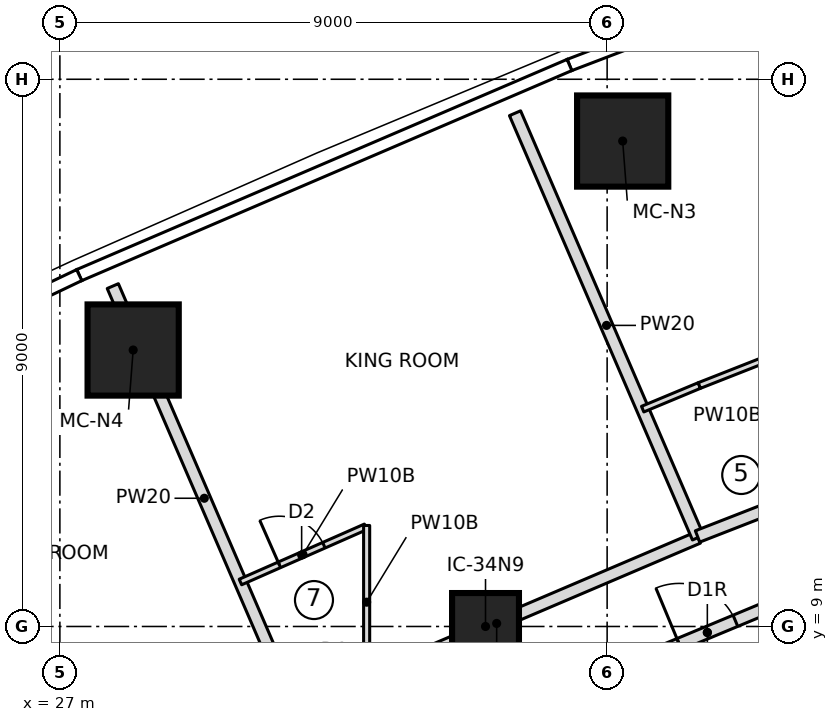
"""IFC4 building model, lengths in metres.
Left out: names, types, materials, properties, quantities, classifications, styles, units other than length and angle.
Written with IfcOpenShell. Run it as: python <this file> out.ifc"""

import sys

from ifc_helpers import new_model, si_unit, direction, frame, frame_2d, origin, origin_2d, place, context, subcontext, project, spatial, rectangle, extrude, element, fill, save


model = new_model("IFC4")
c1 = context("Model", 3, precision=1e-05, world=origin(), true_north=direction((0.0, 1.0)))
c2 = subcontext(c1, "Body", "Model", "MODEL_VIEW")
j1 = project(units=[si_unit("LENGTHUNIT", "METRE"), si_unit("PLANEANGLEUNIT", "RADIAN")], contexts=[c1])
p1 = place(None, origin())
s1 = spatial("IfcSite", under=j1, at=p1, CompositionType="ELEMENT")
p2 = place(p1, origin())
s2 = spatial("IfcBuilding", under=s1, at=p2, CompositionType="ELEMENT")
p3 = place(p2, frame((0.0, 0.0, 137.3)))
s3 = spatial("IfcBuildingStorey", under=s2, at=p3, CompositionType="ELEMENT", Elevation=137.3)
for number, where, z_axis, x_axis in (
    (1, (36.256, 16.984, 0.0), (0.0, 0.0, 1.0), (1.0, 0.0, 0.0)),
    (2, (28.205, 13.547, 0.0), (0.0, 0.0, 1.0), (1.0, 0.0, 0.0)),
):
    element("IfcColumn", number, at=place(p3, frame(where, z_axis=z_axis, x_axis=x_axis)), inside=s3, PredefinedType="COLUMN", context=c2, shape_type="SweptSolid", body=[
        extrude(rectangle(XDim=1.5, YDim=1.5, at=origin_2d()), origin(), (0.0, 0.0, 1.0), 3.55),
    ])
p4 = place(p3, frame((34.0, 9.0, 0.0), z_axis=(0.0, 0.0, 1.0), x_axis=(1.0, 0.0, 0.0)))
e3 = element("IfcColumn", 3, at=p4, inside=s3, PredefinedType="COLUMN", context=c2, shape_type="SweptSolid", body=[
    extrude(rectangle(XDim=1.1, YDim=1.1, at=origin_2d()), origin(), (0.0, 0.0, 1.0), 3.55),
])
p5 = place(p3, frame((30.88, 7.619, 0.0), z_axis=(0.0, 0.0, 1.0), x_axis=(-0.395976934703, 0.91826045716, 0.0)))
e4 = element("IfcWall", 4, at=p5, inside=s3, PredefinedType="PARTITIONING", context=c2, shape_type="SweptSolid", body=[
    extrude(rectangle(XDim=7.6, YDim=0.2, at=frame_2d((3.8, 0.0))), origin(), (0.0, 0.0, 1.0), 3.25),
])
p6 = place(p3, frame((30.872, 7.638, 0.0), z_axis=(0.0, 0.0, 1.0), x_axis=(0.919834621271, 0.392306346509, 0.0)))
e5 = element("IfcWall", 5, at=p6, inside=s3, PredefinedType="PARTITIONING", context=c2, shape_type="SweptSolid", body=[
    extrude(rectangle(XDim=7.2, YDim=0.2, at=frame_2d((3.6, 0.0))), origin(), (0.0, 0.0, 1.0), 3.25),
])
p7 = place(p6, frame((0.2, 0.0, 0.0)))
e6 = element("IfcOpeningElement", 6, at=p7, cuts=e5, PredefinedType="OPENING", context=c2, shape_type="SweptSolid", body=[
    extrude(rectangle(XDim=1.0, YDim=2.1, at=frame_2d((0.5, 1.05))), frame((0.0, 0.11, 0.0), z_axis=(0.0, -1.0, 0.0), x_axis=(1.0, 0.0, 0.0)), (0.0, 0.0, 1.0), 0.22),
])
p8 = place(p3, frame((29.969, 9.731, 0.0), z_axis=(0.0, 0.0, 1.0), x_axis=(0.915118086658, 0.403185921719, 0.0)))
e7 = element("IfcWall", 7, at=p8, inside=s3, PredefinedType="PARTITIONING", context=c2, shape_type="SweptSolid", body=[
    extrude(rectangle(XDim=2.25, YDim=0.1, at=frame_2d((1.125, 0.0))), origin(), (0.0, 0.0, 1.0), 3.25),
])
p9 = place(p8, frame((0.7, 0.0, 0.0)))
e8 = element("IfcOpeningElement", 8, at=p9, cuts=e7, PredefinedType="OPENING", context=c2, shape_type="SweptSolid", body=[
    extrude(rectangle(XDim=0.8, YDim=2.1, at=frame_2d((0.4, 1.05))), frame((0.0, 0.06, 0.0), z_axis=(0.0, -1.0, 0.0), x_axis=(1.0, 0.0, 0.0)), (0.0, 0.0, 1.0), 0.12),
])
p10 = place(p3, frame((37.495, 10.462, 0.0), z_axis=(0.0, 0.0, 1.0), x_axis=(-0.396019423722, 0.918242133664, 0.0)))
e9 = element("IfcWall", 9, at=p10, inside=s3, PredefinedType="PARTITIONING", context=c2, shape_type="SweptSolid", body=[
    extrude(rectangle(XDim=7.601, YDim=0.2, at=frame_2d((3.8, 0.0))), origin(), (0.0, 0.0, 1.0), 3.25),
])
p11 = place(p3, frame((44.199, 13.098, 0.0), z_axis=(0.0, 0.0, 1.0), x_axis=(-0.931657652296, -0.363337334882, 0.0)))
e10 = element("IfcWall", 10, at=p11, inside=s3, PredefinedType="PARTITIONING", context=c2, shape_type="SweptSolid", body=[
    extrude(rectangle(XDim=7.205, YDim=0.2, at=frame_2d((3.602, 0.0))), origin(), (0.0, 0.0, 1.0), 3.25),
])
p12 = place(p11, frame((0.35, 0.0, 0.0)))
e11 = element("IfcOpeningElement", 11, at=p12, cuts=e10, PredefinedType="OPENING", context=c2, shape_type="SweptSolid", body=[
    extrude(rectangle(XDim=1.0, YDim=2.1, at=frame_2d((0.5, 1.05))), frame((0.0, 0.11, 0.0), z_axis=(0.0, -1.0, 0.0), x_axis=(1.0, 0.0, 0.0)), (0.0, 0.0, 1.0), 0.22),
])
p13 = place(p3, frame((36.584, 12.574, 0.0), z_axis=(0.0, 0.0, 1.0), x_axis=(0.923026834192, 0.384735575897, 0.0)))
e12 = element("IfcWall", 12, at=p13, inside=s3, PredefinedType="PARTITIONING", context=c2, shape_type="SweptSolid", body=[
    extrude(rectangle(XDim=1.01, YDim=0.1, at=frame_2d((0.505, 0.0))), origin(), (0.0, 0.0, 1.0), 3.25),
])
p14 = place(p3, frame((37.516, 12.963, 0.0), z_axis=(0.0, 0.0, 1.0), x_axis=(0.930584239012, 0.366077825199, 0.0)))
e13 = element("IfcWall", 13, at=p14, inside=s3, PredefinedType="PARTITIONING", context=c2, shape_type="SweptSolid", body=[
    extrude(rectangle(XDim=1.491, YDim=0.1, at=frame_2d((0.746, 0.0))), origin(), (0.0, 0.0, 1.0), 3.25),
])
p15 = place(p3, frame((36.353, 8.361, 0.0), z_axis=(0.0, 0.0, 1.0), x_axis=(0.922997109092, 0.384806882224, 0.0)))
e14 = element("IfcWall", 14, at=p15, inside=s3, PredefinedType="PARTITIONING", context=c2, shape_type="SweptSolid", body=[
    extrude(rectangle(XDim=2.806, YDim=0.2, at=frame_2d((1.403, 0.0))), origin(), (0.0, 0.0, 1.0), 3.25),
])
p16 = place(p15, frame((0.903, 0.0, 0.0)))
e15 = element("IfcOpeningElement", 15, at=p16, cuts=e14, PredefinedType="OPENING", context=c2, shape_type="SweptSolid", body=[
    extrude(rectangle(XDim=1.0, YDim=2.1, at=frame_2d((0.5, 1.05))), frame((0.0, 0.11, 0.0), z_axis=(0.0, -1.0, 0.0), x_axis=(1.0, 0.0, 0.0)), (0.0, 0.0, 1.0), 0.22),
])
p17 = place(p3, frame((32.045, 10.661, 0.0), z_axis=(0.0, 0.0, 1.0), x_axis=(0.0, -1.0, 0.0)))
e16 = element("IfcWall", 16, at=p17, inside=s3, PredefinedType="PARTITIONING", context=c2, shape_type="SweptSolid", body=[
    extrude(rectangle(XDim=2.523, YDim=0.1, at=frame_2d((1.261, 0.0))), origin(), (0.0, 0.0, 1.0), 3.25),
])
p18 = place(p9, origin())
e17 = element("IfcDoor", 17, at=p18, inside=s3, OperationType="SINGLE_SWING_LEFT", PredefinedType="DOOR", context=c2, shape_type="SweptSolid", body=[
    extrude(rectangle(XDim=0.8, YDim=2.1, at=frame_2d((0.4, 1.05))), frame((0.0, 0.025, 0.0), z_axis=(0.0, -1.0, 0.0), x_axis=(1.0, 0.0, 0.0)), (0.0, 0.0, 1.0), 0.05),
])
fill(e8, e17)
p19 = place(p16, origin())
e18 = element("IfcDoor", 18, at=p19, inside=s3, OperationType="SINGLE_SWING_RIGHT", PredefinedType="DOOR", context=c2, shape_type="SweptSolid", body=[
    extrude(rectangle(XDim=1.0, YDim=2.1, at=frame_2d((0.5, 1.05))), frame((0.0, 0.025, 0.0), z_axis=(0.0, -1.0, 0.0), x_axis=(1.0, 0.0, 0.0)), (0.0, 0.0, 1.0), 0.05),
])
fill(e15, e18)
save(model, sys.argv[1])
